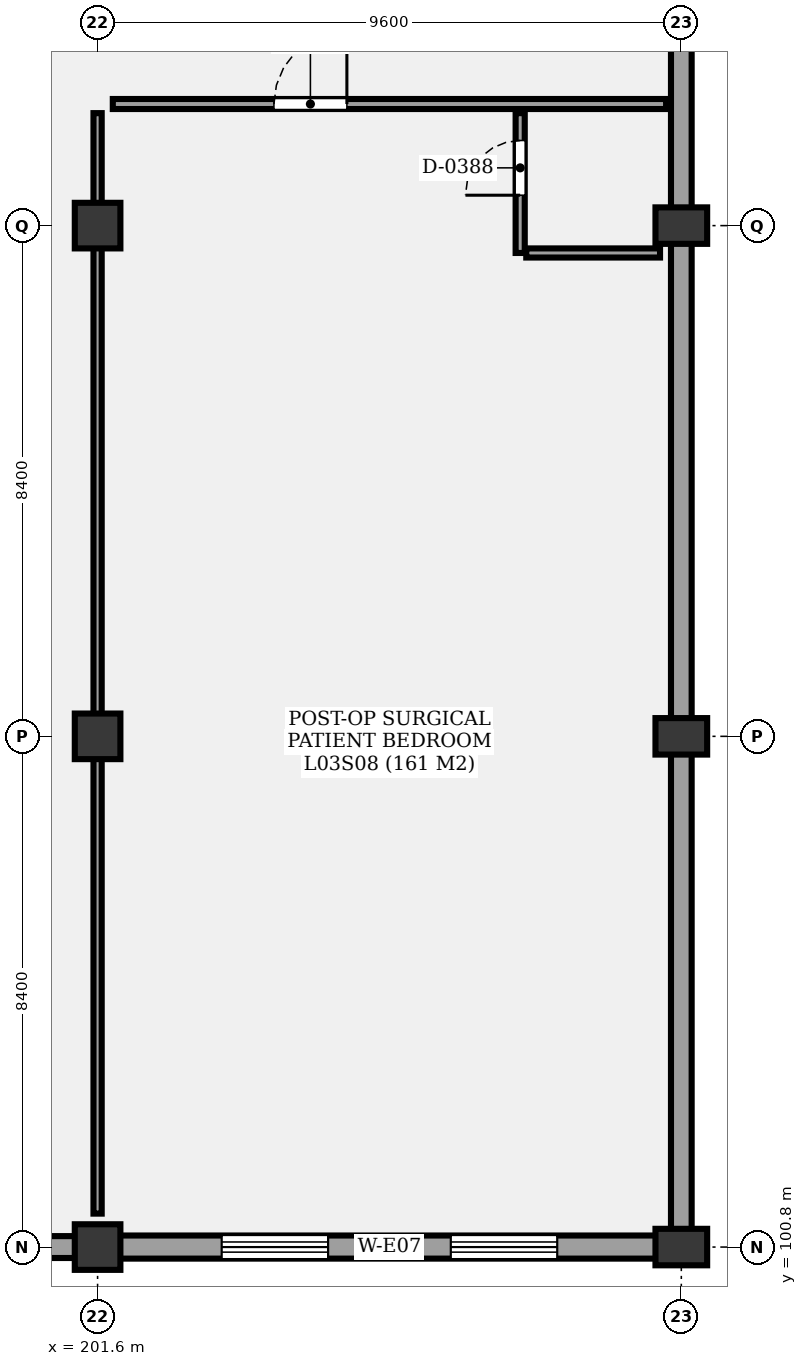
"""IFC4 building model, lengths in metres.
Left out: names, types, materials, properties, quantities, classifications, styles, units other than length and angle.
Written with IfcOpenShell. Run it as: python <this file> out.ifc"""

import sys

from ifc_helpers import new_model, si_unit, direction, frame, frame_2d, origin, origin_2d, place, context, subcontext, project, spatial, rectangle, extrude, element, fill, save


model = new_model("IFC4")
c1 = context("Model", 3, precision=1e-05, world=origin(), true_north=direction((0.0, 1.0)))
c2 = subcontext(c1, "Body", "Model", "MODEL_VIEW")
j1 = project(units=[si_unit("LENGTHUNIT", "METRE"), si_unit("PLANEANGLEUNIT", "RADIAN")], contexts=[c1])
p1 = place(None, origin())
s1 = spatial("IfcSite", under=j1, at=p1, CompositionType="ELEMENT")
p2 = place(p1, origin())
s2 = spatial("IfcBuilding", under=s1, at=p2, CompositionType="ELEMENT")
p3 = place(p2, frame((0.0, 0.0, 13.5)))
s3 = spatial("IfcBuildingStorey", under=s2, at=p3, CompositionType="ELEMENT", Elevation=13.5)
for number, where, z_axis, x_axis in (
    (1, (201.6, 100.8, 0.0), (0.0, 0.0, 1.0), (1.0, 0.0, 0.0)),
    (2, (201.6, 109.2, 0.0), (0.0, 0.0, 1.0), (1.0, 0.0, 0.0)),
    (3, (201.6, 117.6, 0.0), (0.0, 0.0, 1.0), (1.0, 0.0, 0.0)),
):
    element("IfcColumn", number, at=place(p3, frame(where, z_axis=z_axis, x_axis=x_axis)), inside=s3, PredefinedType="COLUMN", context=c2, shape_type="SweptSolid", body=[
        extrude(rectangle(XDim=0.75, YDim=0.75, at=origin_2d()), origin(), (0.0, 0.0, 1.0), 4.3),
    ])
for number, where, z_axis, x_axis in (
    (4, (211.2, 100.8, 0.0), (0.0, 0.0, 1.0), (1.0, 0.0, 0.0)),
    (5, (211.2, 109.2, 0.0), (0.0, 0.0, 1.0), (1.0, 0.0, 0.0)),
    (6, (211.2, 117.6, 0.0), (0.0, 0.0, 1.0), (1.0, 0.0, 0.0)),
):
    element("IfcColumn", number, at=place(p3, frame(where, z_axis=z_axis, x_axis=x_axis)), inside=s3, PredefinedType="COLUMN", context=c2, shape_type="SweptSolid", body=[
        extrude(rectangle(XDim=0.85, YDim=0.6, at=origin_2d()), origin(), (0.0, 0.0, 1.0), 4.3),
    ])
p4 = place(p3, frame((201.6, 100.8, 0.0), z_axis=(0.0, 0.0, 1.0), x_axis=(-1.0, 0.0, 0.0)))
e7 = element("IfcWall", 7, at=p4, inside=s3, PredefinedType="SOLIDWALL", context=c2, shape_type="SweptSolid", body=[
    extrude(rectangle(XDim=9.6, YDim=0.36, at=frame_2d((4.8, 0.0))), origin(), (0.0, 0.0, 1.0), 3.49),
])
p5 = place(p4, frame((2.08, 0.0, 0.85)))
e8 = element("IfcOpeningElement", 8, at=p5, cuts=e7, PredefinedType="OPENING", context=c2, shape_type="SweptSolid", body=[
    extrude(rectangle(XDim=1.6, YDim=1.2, at=frame_2d((0.8, 0.6))), frame((0.0, 0.19, 0.0), z_axis=(0.0, -1.0, 0.0), x_axis=(1.0, 0.0, 0.0)), (0.0, 0.0, 1.0), 0.38),
])
p6 = place(p4, frame((5.92, 0.0, 0.85)))
e9 = element("IfcOpeningElement", 9, at=p6, cuts=e7, PredefinedType="OPENING", context=c2, shape_type="SweptSolid", body=[
    extrude(rectangle(XDim=1.6, YDim=1.2, at=frame_2d((0.8, 0.6))), frame((0.0, 0.19, 0.0), z_axis=(0.0, -1.0, 0.0), x_axis=(1.0, 0.0, 0.0)), (0.0, 0.0, 1.0), 0.38),
])
p7 = place(p3, frame((211.2, 100.8, 0.0), z_axis=(0.0, 0.0, 1.0), x_axis=(-1.0, 0.0, 0.0)))
e10 = element("IfcWall", 10, at=p7, inside=s3, PredefinedType="SOLIDWALL", context=c2, shape_type="SweptSolid", body=[
    extrude(rectangle(XDim=9.6, YDim=0.38, at=frame_2d((4.8, 0.0))), origin(), (0.0, 0.0, 1.0), 3.49),
])
p8 = place(p7, frame((2.041, 0.0, 0.85)))
e11 = element("IfcOpeningElement", 11, at=p8, cuts=e10, PredefinedType="OPENING", context=c2, shape_type="SweptSolid", body=[
    extrude(rectangle(XDim=1.75, YDim=1.2, at=frame_2d((0.875, 0.6))), frame((0.0, 0.2, 0.0), z_axis=(0.0, -1.0, 0.0), x_axis=(1.0, 0.0, 0.0)), (0.0, 0.0, 1.0), 0.4),
])
p9 = place(p7, frame((5.809, 0.0, 0.85)))
e12 = element("IfcOpeningElement", 12, at=p9, cuts=e10, PredefinedType="OPENING", context=c2, shape_type="SweptSolid", body=[
    extrude(rectangle(XDim=1.75, YDim=1.2, at=frame_2d((0.875, 0.6))), frame((0.0, 0.2, 0.0), z_axis=(0.0, -1.0, 0.0), x_axis=(1.0, 0.0, 0.0)), (0.0, 0.0, 1.0), 0.4),
])
p10 = place(p3, frame((211.2, 134.24, 0.0), z_axis=(0.0, 0.0, 1.0), x_axis=(0.0, -1.0, 0.0)))
e13 = element("IfcWall", 13, at=p10, inside=s3, PredefinedType="SOLIDWALL", context=c2, shape_type="SweptSolid", body=[
    extrude(rectangle(XDim=33.28, YDim=0.34, at=frame_2d((16.64, 0.0))), origin(), (0.0, 0.0, 1.0), 3.49),
])
p11 = place(p3, frame((201.85, 119.6, 0.0), z_axis=(0.0, 0.0, 1.0), x_axis=(1.0, 0.0, 0.0)))
e14 = element("IfcWall", 14, at=p11, inside=s3, PredefinedType="PARTITIONING", context=c2, shape_type="SweptSolid", body=[
    extrude(rectangle(XDim=9.1, YDim=0.165, at=frame_2d((4.55, 0.0))), origin(), (0.0, 0.0, 1.0), 3.4),
])
p12 = place(p11, frame((2.65, 0.0, 0.0)))
e15 = element("IfcOpeningElement", 15, at=p12, cuts=e14, PredefinedType="OPENING", context=c2, shape_type="SweptSolid", body=[
    extrude(rectangle(XDim=1.2, YDim=2.2, at=frame_2d((0.6, 1.1))), frame((0.0, 0.093, 0.0), z_axis=(0.0, -1.0, 0.0), x_axis=(1.0, 0.0, 0.0)), (0.0, 0.0, 1.0), 0.185),
])
p13 = place(p3, frame((208.55, 117.15, 0.0), z_axis=(0.0, 0.0, 1.0), x_axis=(0.0, 1.0, 0.0)))
e16 = element("IfcWall", 16, at=p13, inside=s3, PredefinedType="PARTITIONING", context=c2, shape_type="SweptSolid", body=[
    extrude(rectangle(XDim=2.3, YDim=0.15, at=frame_2d((1.15, 0.0))), origin(), (0.0, 0.0, 1.0), 3.4),
])
p14 = place(p13, frame((0.95, 0.0, 0.0)))
e17 = element("IfcOpeningElement", 17, at=p14, cuts=e16, PredefinedType="OPENING", context=c2, shape_type="SweptSolid", body=[
    extrude(rectangle(XDim=0.9, YDim=2.1, at=frame_2d((0.45, 1.05))), frame((0.0, 0.085, 0.0), z_axis=(0.0, -1.0, 0.0), x_axis=(1.0, 0.0, 0.0)), (0.0, 0.0, 1.0), 0.17),
])
p15 = place(p3, frame((208.65, 117.15, 0.0), z_axis=(0.0, 0.0, 1.0), x_axis=(1.0, 0.0, 0.0)))
e18 = element("IfcWall", 18, at=p15, inside=s3, PredefinedType="PARTITIONING", context=c2, shape_type="SweptSolid", body=[
    extrude(rectangle(XDim=2.2, YDim=0.15, at=frame_2d((1.1, 0.0))), origin(), (0.0, 0.0, 1.0), 3.4),
])
p16 = place(p3, frame((201.6, 101.35, 0.0), z_axis=(0.0, 0.0, 1.0), x_axis=(0.0, 1.0, 0.0)))
e19 = element("IfcWall", 19, at=p16, inside=s3, PredefinedType="PARTITIONING", context=c2, shape_type="SweptSolid", body=[
    extrude(rectangle(XDim=18.1, YDim=0.135, at=frame_2d((9.05, 0.0))), origin(), (0.0, 0.0, 1.0), 3.4),
])
p17 = place(p8, origin())
e20 = element("IfcWindow", 20, at=p17, inside=s3, PartitioningType="SINGLE_PANEL", PredefinedType="WINDOW", context=c2, shape_type="SweptSolid", body=[
    extrude(rectangle(XDim=1.75, YDim=1.2, at=frame_2d((0.875, 0.6))), frame((0.0, 0.03, 0.0), z_axis=(0.0, -1.0, 0.0), x_axis=(1.0, 0.0, 0.0)), (0.0, 0.0, 1.0), 0.06),
])
fill(e11, e20)
p18 = place(p9, origin())
e21 = element("IfcWindow", 21, at=p18, inside=s3, PartitioningType="SINGLE_PANEL", PredefinedType="WINDOW", context=c2, shape_type="SweptSolid", body=[
    extrude(rectangle(XDim=1.75, YDim=1.2, at=frame_2d((0.875, 0.6))), frame((0.0, 0.03, 0.0), z_axis=(0.0, -1.0, 0.0), x_axis=(1.0, 0.0, 0.0)), (0.0, 0.0, 1.0), 0.06),
])
fill(e12, e21)
p19 = place(p12, origin())
e22 = element("IfcDoor", 22, at=p19, inside=s3, OperationType="SINGLE_SWING_RIGHT", PredefinedType="DOOR", context=c2, shape_type="SweptSolid", body=[
    extrude(rectangle(XDim=1.2, YDim=2.2, at=frame_2d((0.6, 1.1))), frame((0.0, 0.025, 0.0), z_axis=(0.0, -1.0, 0.0), x_axis=(1.0, 0.0, 0.0)), (0.0, 0.0, 1.0), 0.05),
])
fill(e15, e22)
p20 = place(p14, origin())
e23 = element("IfcDoor", 23, at=p20, inside=s3, OperationType="SINGLE_SWING_LEFT", PredefinedType="DOOR", context=c2, shape_type="SweptSolid", body=[
    extrude(rectangle(XDim=0.9, YDim=2.1, at=frame_2d((0.45, 1.05))), frame((0.0, 0.025, 0.0), z_axis=(0.0, -1.0, 0.0), x_axis=(1.0, 0.0, 0.0)), (0.0, 0.0, 1.0), 0.05),
])
fill(e17, e23)
save(model, sys.argv[1])
